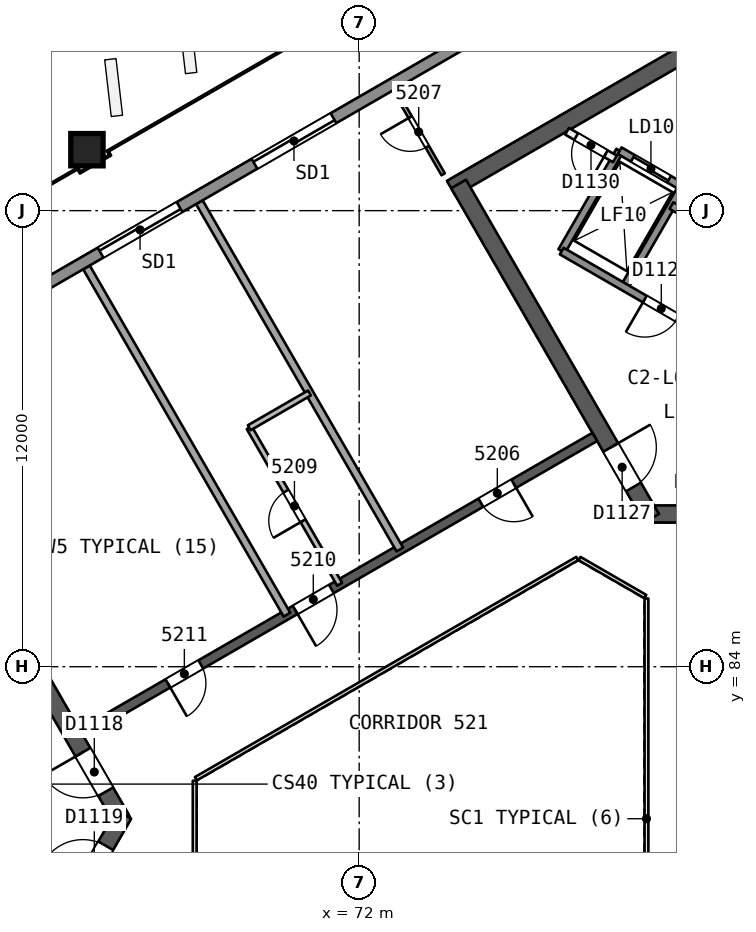
"""IFC4 building model, lengths in metres.
Left out: names, types, materials, properties, quantities, classifications, styles, units other than length and angle.
Written with IfcOpenShell. Run it as: python <this file> out.ifc"""

import sys

from ifc_helpers import new_model, si_unit, direction, frame, frame_2d, origin, origin_2d, place, context, subcontext, project, spatial, rectangle, extrude, element, fill, save


model = new_model("IFC4")
c1 = context("Model", 3, precision=1e-05, world=origin(), true_north=direction((0.0, 1.0)))
c2 = subcontext(c1, "Body", "Model", "MODEL_VIEW")
j1 = project(units=[si_unit("LENGTHUNIT", "METRE"), si_unit("PLANEANGLEUNIT", "RADIAN")], contexts=[c1])
p1 = place(None, origin())
s1 = spatial("IfcSite", under=j1, at=p1, CompositionType="ELEMENT")
p2 = place(p1, origin())
s2 = spatial("IfcBuilding", under=s1, at=p2, CompositionType="ELEMENT")
p3 = place(p2, frame((0.0, 0.0, 213.2)))
s3 = spatial("IfcBuildingStorey", under=s2, at=p3, CompositionType="ELEMENT", Elevation=213.2)
p4 = place(p3, frame((65.74, 80.0, 0.0), z_axis=(0.0, 0.0, 1.0), x_axis=(-0.499991857942, 0.866030104553, 0.0)))
e1 = element("IfcWall", 1, at=p4, inside=s3, PredefinedType="SHEAR", context=c2, shape_type="SweptSolid", body=[
    extrude(rectangle(XDim=10.25, YDim=0.45, at=frame_2d((5.125, 0.0))), origin(), (0.0, 0.0, 1.0), 3.7),
])
p5 = place(p4, frame((0.82, 0.0, 0.0)))
e2 = element("IfcOpeningElement", 2, at=p5, cuts=e1, PredefinedType="OPENING", context=c2, shape_type="SweptSolid", body=[
    extrude(rectangle(XDim=1.2, YDim=2.1, at=frame_2d((0.6, 1.05))), frame((0.0, 0.235, 0.0), z_axis=(0.0, -1.0, 0.0), x_axis=(1.0, 0.0, 0.0)), (0.0, 0.0, 1.0), 0.471),
])
p6 = place(p3, frame((60.728, 71.318, 0.0), z_axis=(0.0, 0.0, 1.0), x_axis=(0.500012416173, 0.866018235185, 0.0)))
e3 = element("IfcWall", 3, at=p6, inside=s3, PredefinedType="SHEAR", context=c2, shape_type="SweptSolid", body=[
    extrude(rectangle(XDim=10.155, YDim=0.45, at=frame_2d((5.078, 0.0))), origin(), (0.0, 0.0, 1.0), 3.7),
])
p7 = place(p6, frame((8.005, 0.0, 0.0)))
e4 = element("IfcOpeningElement", 4, at=p7, cuts=e3, PredefinedType="OPENING", context=c2, shape_type="SweptSolid", body=[
    extrude(rectangle(XDim=1.2, YDim=2.1, at=frame_2d((0.6, 1.05))), frame((0.0, 0.235, 0.0), z_axis=(0.0, -1.0, 0.0), x_axis=(1.0, 0.0, 0.0)), (0.0, 0.0, 1.0), 0.471),
])
p8 = place(p3, frame((79.63, 88.019, 0.0), z_axis=(0.0, 0.0, 1.0), x_axis=(1.0, 0.0, 0.0)))
e5 = element("IfcWall", 5, at=p8, inside=s3, PredefinedType="SHEAR", context=c2, shape_type="SweptSolid", body=[
    extrude(rectangle(XDim=10.25, YDim=0.45, at=frame_2d((5.125, 0.0))), origin(), (0.0, 0.0, 1.0), 3.7),
])
p9 = place(p8, frame((0.82, 0.0, 0.0)))
e6 = element("IfcOpeningElement", 6, at=p9, cuts=e5, PredefinedType="OPENING", context=c2, shape_type="SweptSolid", body=[
    extrude(rectangle(XDim=1.2, YDim=2.1, at=frame_2d((0.6, 1.05))), frame((0.0, 0.235, 0.0), z_axis=(0.0, -1.0, 0.0), x_axis=(1.0, 0.0, 0.0)), (0.0, 0.0, 1.0), 0.471),
])
p10 = place(p3, frame((86.723, 103.69, 0.0), z_axis=(0.0, 0.0, 1.0), x_axis=(-0.866022713978, -0.500004658852, 0.0)))
e7 = element("IfcWall", 7, at=p10, inside=s3, PredefinedType="SHEAR", context=c2, shape_type="SweptSolid", body=[
    extrude(rectangle(XDim=14.203, YDim=0.45, at=frame_2d((7.102, 0.0))), origin(), (0.0, 0.0, 1.0), 3.7),
])
p11 = place(p3, frame((74.617, 96.701, 0.0), z_axis=(0.0, 0.0, 1.0), x_axis=(0.499994385119, -0.866028645513, 0.0)))
e8 = element("IfcWall", 8, at=p11, inside=s3, PredefinedType="SHEAR", context=c2, shape_type="SweptSolid", body=[
    extrude(rectangle(XDim=10.155, YDim=0.45, at=frame_2d((5.077, 0.0))), origin(), (0.0, 0.0, 1.0), 3.7),
])
p12 = place(p11, frame((8.005, 0.0, 0.0)))
e9 = element("IfcOpeningElement", 9, at=p12, cuts=e8, PredefinedType="OPENING", context=c2, shape_type="SweptSolid", body=[
    extrude(rectangle(XDim=1.2, YDim=2.1, at=frame_2d((0.6, 1.05))), frame((0.0, 0.235, 0.0), z_axis=(0.0, -1.0, 0.0), x_axis=(1.0, 0.0, 0.0)), (0.0, 0.0, 1.0), 0.471),
])
p13 = place(p3, frame((78.2, 90.046, 0.0), z_axis=(0.0, 0.0, 1.0), x_axis=(-0.866026492143, -0.499998114903, 0.0)))
e10 = element("IfcWall", 10, at=p13, inside=s3, PredefinedType="SHEAR", context=c2, shape_type="SweptSolid", body=[
    extrude(rectangle(XDim=15.588, YDim=0.25, at=frame_2d((7.794, 0.0))), origin(), (0.0, 0.0, 1.0), 3.3),
])
p14 = place(p13, frame((2.462, 0.0, 0.0)))
e11 = element("IfcOpeningElement", 11, at=p14, cuts=e10, PredefinedType="OPENING", context=c2, shape_type="SweptSolid", body=[
    extrude(rectangle(XDim=1.0, YDim=2.1, at=frame_2d((0.5, 1.05))), frame((0.0, 0.135, 0.0), z_axis=(0.0, -1.0, 0.0), x_axis=(1.0, 0.0, 0.0)), (0.0, 0.0, 1.0), 0.271),
])
p15 = place(p13, frame((8.003, 0.0, 0.0)))
e12 = element("IfcOpeningElement", 12, at=p15, cuts=e10, PredefinedType="OPENING", context=c2, shape_type="SweptSolid", body=[
    extrude(rectangle(XDim=1.1, YDim=2.1, at=frame_2d((0.55, 1.05))), frame((0.0, 0.135, 0.0), z_axis=(0.0, -1.0, 0.0), x_axis=(1.0, 0.0, 0.0)), (0.0, 0.0, 1.0), 0.271),
])
p16 = place(p13, frame((11.971, 0.0, 0.0)))
e13 = element("IfcOpeningElement", 13, at=p16, cuts=e10, PredefinedType="OPENING", context=c2, shape_type="SweptSolid", body=[
    extrude(rectangle(XDim=1.0, YDim=2.1, at=frame_2d((0.5, 1.05))), frame((0.0, 0.135, 0.0), z_axis=(0.0, -1.0, 0.0), x_axis=(1.0, 0.0, 0.0)), (0.0, 0.0, 1.0), 0.271),
])
p17 = place(p3, frame((64.824, 97.625, 0.0), z_axis=(0.010093620709, -0.017482414954, 0.999796221231), x_axis=(0.866011056618, 0.500024849197, 4.54858e-07)))
e14 = element("IfcColumn", 14, at=p17, inside=s3, PredefinedType="COLUMN", context=c2, shape_type="SweptSolid", body=[
    extrude(rectangle(XDim=0.85, YDim=0.85, at=origin_2d()), origin(), (0.0, 0.0, 1.0), 3.701),
])
p18 = place(p3, frame((74.21, 96.956, 0.0), z_axis=(0.0, 0.0, 1.0), x_axis=(-0.49995513091, 0.866051307416, 0.0)))
e15 = element("IfcWall", 15, at=p18, inside=s3, PredefinedType="PARTITIONING", context=c2, shape_type="SweptSolid", body=[
    extrude(rectangle(XDim=2.573, YDim=0.1, at=frame_2d((1.287, 0.0))), origin(), (0.0, 0.0, 1.0), 3.3),
])
p19 = place(p18, frame((0.837, 0.0, 0.0)))
e16 = element("IfcOpeningElement", 16, at=p19, cuts=e15, PredefinedType="OPENING", context=c2, shape_type="SweptSolid", body=[
    extrude(rectangle(XDim=0.9, YDim=2.1, at=frame_2d((0.45, 1.05))), frame((0.0, 0.061, 0.0), z_axis=(0.0, -1.0, 0.0), x_axis=(1.0, 0.0, 0.0)), (0.0, 0.0, 1.0), 0.121),
])
p20 = place(p3, frame((67.794, 96.223, 0.0), z_axis=(0.0, 0.0, 1.0), x_axis=(0.500010840071, -0.866019145176, 0.0)))
e17 = element("IfcWall", 17, at=p20, inside=s3, PredefinedType="PARTITIONING", context=c2, shape_type="SweptSolid", body=[
    extrude(rectangle(XDim=10.552, YDim=0.2, at=frame_2d((5.276, 0.0))), origin(), (0.0, 0.0, 1.0), 3.3),
])
p21 = place(p3, frame((71.486, 86.169, 0.0), z_axis=(0.0, 0.0, 1.0), x_axis=(-0.499987613552, 0.866032554986, 0.0)))
e18 = element("IfcWall", 18, at=p21, inside=s3, PredefinedType="PARTITIONING", context=c2, shape_type="SweptSolid", body=[
    extrude(rectangle(XDim=4.755, YDim=0.15, at=frame_2d((2.378, 0.0))), origin(), (0.0, 0.0, 1.0), 3.3),
])
p22 = place(p21, frame((1.928, 0.0, 0.0)))
e19 = element("IfcOpeningElement", 19, at=p22, cuts=e18, PredefinedType="OPENING", context=c2, shape_type="SweptSolid", body=[
    extrude(rectangle(XDim=0.9, YDim=2.1, at=frame_2d((0.45, 1.05))), frame((0.0, 0.085, 0.0), z_axis=(0.0, -1.0, 0.0), x_axis=(1.0, 0.0, 0.0)), (0.0, 0.0, 1.0), 0.171),
])
p23 = place(p3, frame((69.108, 90.288, 0.0), z_axis=(0.0, 0.0, 1.0), x_axis=(0.866050016054, 0.499957367875, 0.0)))
e20 = element("IfcWall", 20, at=p23, inside=s3, PredefinedType="PARTITIONING", context=c2, shape_type="SweptSolid", body=[
    extrude(rectangle(XDim=1.829, YDim=0.15, at=frame_2d((0.915, 0.0))), origin(), (0.0, 0.0, 1.0), 3.3),
])
p24 = place(p3, frame((64.824, 94.508, 0.0), z_axis=(0.0, 0.0, 1.0), x_axis=(0.500010840071, -0.866019145176, 0.0)))
e21 = element("IfcWall", 21, at=p24, inside=s3, PredefinedType="PARTITIONING", context=c2, shape_type="SweptSolid", body=[
    extrude(rectangle(XDim=10.552, YDim=0.2, at=frame_2d((5.276, 0.0))), origin(), (0.0, 0.0, 1.0), 3.3),
])
p25 = place(p3, frame((43.933, 82.619, 0.0), z_axis=(0.0, 0.0, 1.0), x_axis=(0.866026349667, 0.49999836168, 0.0)))
e22 = element("IfcWall", 22, at=p25, inside=s3, PredefinedType="SOLIDWALL", context=c2, shape_type="SweptSolid", body=[
    extrude(rectangle(XDim=51.192, YDim=0.3, at=frame_2d((25.596, 0.0))), origin(), (0.0, 0.0, 1.0), 3.3),
])
p26 = place(p25, frame((24.552, 0.0, 0.0)))
e23 = element("IfcOpeningElement", 23, at=p26, cuts=e22, PredefinedType="OPENING", context=c2, shape_type="SweptSolid", body=[
    extrude(rectangle(XDim=2.4, YDim=2.4, at=frame_2d((1.2, 1.2))), frame((0.0, 0.161, 0.0), z_axis=(0.0, -1.0, 0.0), x_axis=(1.0, 0.0, 0.0)), (0.0, 0.0, 1.0), 0.321),
])
p27 = place(p25, frame((29.228, 0.0, 0.0)))
e24 = element("IfcOpeningElement", 24, at=p27, cuts=e22, PredefinedType="OPENING", context=c2, shape_type="SweptSolid", body=[
    extrude(rectangle(XDim=2.4, YDim=2.4, at=frame_2d((1.2, 1.2))), frame((0.0, 0.161, 0.0), z_axis=(0.0, -1.0, 0.0), x_axis=(1.0, 0.0, 0.0)), (0.0, 0.0, 1.0), 0.321),
])
p28 = place(p25, frame((39.819, 0.0, 0.0)))
e25 = element("IfcOpeningElement", 25, at=p28, cuts=e22, PredefinedType="OPENING", context=c2, shape_type="SweptSolid", body=[
    extrude(rectangle(XDim=2.4, YDim=2.4, at=frame_2d((1.2, 1.2))), frame((0.0, 0.161, 0.0), z_axis=(0.0, -1.0, 0.0), x_axis=(1.0, 0.0, 0.0)), (0.0, 0.0, 1.0), 0.321),
])
p29 = place(p25, frame((19.719, 0.0, 0.0)))
e26 = element("IfcOpeningElement", 26, at=p29, cuts=e22, PredefinedType="OPENING", context=c2, shape_type="SweptSolid", body=[
    extrude(rectangle(XDim=2.4, YDim=2.4, at=frame_2d((1.2, 1.2))), frame((0.0, 0.161, 0.0), z_axis=(0.0, -1.0, 0.0), x_axis=(1.0, 0.0, 0.0)), (0.0, 0.0, 1.0), 0.321),
])
p30 = place(p25, frame((8.993, 0.0, 0.0)))
e27 = element("IfcOpeningElement", 27, at=p30, cuts=e22, PredefinedType="OPENING", context=c2, shape_type="SweptSolid", body=[
    extrude(rectangle(XDim=2.4, YDim=2.4, at=frame_2d((1.2, 1.2))), frame((0.0, 0.161, 0.0), z_axis=(0.0, -1.0, 0.0), x_axis=(1.0, 0.0, 0.0)), (0.0, 0.0, 1.0), 0.321),
])
for number, where, z_axis, x_axis in (
    (28, (78.976, 93.986, 0.0), (0.0, 0.0, 1.0), (0.5, 0.866, 0.0)),
    (29, (77.33, 94.936, 0.0), (0.0, 0.0, 1.0), (0.5, 0.866, 0.0)),
):
    element("IfcWall", number, at=place(p3, frame(where, z_axis=z_axis, x_axis=x_axis)), inside=s3, PredefinedType="SOLIDWALL", context=c2, shape_type="SweptSolid", body=[
        extrude(rectangle(XDim=3.05, YDim=0.2, at=frame_2d((1.525, 0.0))), origin(), (0.0, 0.0, 1.0), 3.3),
    ])
p31 = place(p3, frame((86.77, 89.486, 0.0), z_axis=(0.0, 0.0, 1.0), x_axis=(-0.86601811187, 0.500012629753, 0.0)))
e30 = element("IfcWall", 30, at=p31, inside=s3, PredefinedType="SOLIDWALL", context=c2, shape_type="SweptSolid", body=[
    extrude(rectangle(XDim=10.9, YDim=0.2, at=frame_2d((5.45, 0.0))), origin(), (0.0, 0.0, 1.0), 3.3),
])
p32 = place(p31, frame((2.875, 0.0, 0.0)))
e31 = element("IfcOpeningElement", 31, at=p32, cuts=e30, PredefinedType="OPENING", context=c2, shape_type="SweptSolid", body=[
    extrude(rectangle(XDim=1.0, YDim=2.1, at=frame_2d((0.5, 1.05))), frame((0.0, 0.11, 0.0), z_axis=(0.0, -1.0, 0.0), x_axis=(1.0, 0.0, 0.0)), (0.0, 0.0, 1.0), 0.221),
])
p33 = place(p31, frame((7.375, 0.0, 0.0)))
e32 = element("IfcOpeningElement", 32, at=p33, cuts=e30, PredefinedType="OPENING", context=c2, shape_type="SweptSolid", body=[
    extrude(rectangle(XDim=1.0, YDim=2.1, at=frame_2d((0.5, 1.05))), frame((0.0, 0.11, 0.0), z_axis=(0.0, -1.0, 0.0), x_axis=(1.0, 0.0, 0.0)), (0.0, 0.0, 1.0), 0.221),
])
p34 = place(p3, frame((89.43, 90.814, 0.0), z_axis=(0.0, 0.0, 1.0), x_axis=(-0.866018983788, 0.500011119594, 0.0)))
e33 = element("IfcWall", 33, at=p34, inside=s3, PredefinedType="SOLIDWALL", context=c2, shape_type="SweptSolid", body=[
    extrude(rectangle(XDim=10.64, YDim=0.2, at=frame_2d((5.32, 0.0))), origin(), (0.0, 0.0, 1.0), 3.3),
])
p35 = place(p34, frame((0.37, 0.0, 0.0)))
e34 = element("IfcOpeningElement", 34, at=p35, cuts=e33, PredefinedType="OPENING", context=c2, shape_type="SweptSolid", body=[
    extrude(rectangle(XDim=0.9, YDim=2.1, at=frame_2d((0.45, 1.05))), frame((0.0, 0.11, 0.0), z_axis=(0.0, -1.0, 0.0), x_axis=(1.0, 0.0, 0.0)), (0.0, 0.0, 1.0), 0.221),
])
p36 = place(p3, frame((78.73, 97.361, 0.0), z_axis=(0.0, 0.0, 1.0), x_axis=(-0.866045896294, 0.499964504253, 0.0)))
e35 = element("IfcWall", 35, at=p36, inside=s3, PredefinedType="PARTITIONING", context=c2, shape_type="SweptSolid", body=[
    extrude(rectangle(XDim=1.455, YDim=0.2, at=frame_2d((0.728, 0.0))), origin(), (0.0, 0.0, 1.0), 3.3),
])
p37 = place(p36, frame((0.278, 0.0, 0.0)))
e36 = element("IfcOpeningElement", 36, at=p37, cuts=e35, PredefinedType="OPENING", context=c2, shape_type="SweptSolid", body=[
    extrude(rectangle(XDim=0.9, YDim=2.1, at=frame_2d((0.45, 1.05))), frame((0.0, 0.11, 0.0), z_axis=(0.0, -1.0, 0.0), x_axis=(1.0, 0.0, 0.0)), (0.0, 0.0, 1.0), 0.221),
])
p38 = place(p3, frame((80.5, 96.627, 0.0), z_axis=(0.0, 0.0, 1.0), x_axis=(-0.86601224135, 0.500022797313, 0.0)))
e37 = element("IfcWall", 37, at=p38, inside=s3, PredefinedType="SOLIDWALL", context=c2, shape_type="SweptSolid", body=[
    extrude(rectangle(XDim=1.9, YDim=0.2, at=frame_2d((0.95, 0.0))), origin(), (0.0, 0.0, 1.0), 3.3),
])
p39 = place(p38, frame((0.4, 0.0, 0.0)))
e38 = element("IfcOpeningElement", 38, at=p39, cuts=e37, PredefinedType="OPENING", context=c2, shape_type="SweptSolid", body=[
    extrude(rectangle(XDim=1.1, YDim=2.1, at=frame_2d((0.55, 1.05))), frame((0.0, 0.11, 0.0), z_axis=(0.0, -1.0, 0.0), x_axis=(1.0, 0.0, 0.0)), (0.0, 0.0, 1.0), 0.221),
])
p40 = place(p3, frame((79.56, 74.206, 0.0), z_axis=(0.0, 0.0, 1.0), x_axis=(0.0, 1.0, 0.0)))
e39 = element("IfcWall", 39, at=p40, inside=s3, PredefinedType="PARTITIONING", context=c2, shape_type="SweptSolid", body=[
    extrude(rectangle(XDim=11.588, YDim=0.1, at=frame_2d((5.794, 0.0))), origin(), (0.0, 0.0, 1.0), 3.3),
])
p41 = place(p3, frame((79.53, 85.846, 0.0), z_axis=(0.0, 0.0, 1.0), x_axis=(-0.866041268327, 0.499972520799, 0.0)))
e40 = element("IfcWall", 40, at=p41, inside=s3, PredefinedType="PARTITIONING", context=c2, shape_type="SweptSolid", body=[
    extrude(rectangle(XDim=2.0, YDim=0.1, at=frame_2d((1.0, 0.0))), origin(), (0.0, 0.0, 1.0), 3.3),
])
p42 = place(p3, frame((77.738, 86.846, 0.0), z_axis=(0.0, 0.0, 1.0), x_axis=(-0.866026658274, -0.499997827154, 0.0)))
e41 = element("IfcWall", 41, at=p42, inside=s3, PredefinedType="PARTITIONING", context=c2, shape_type="SweptSolid", body=[
    extrude(rectangle(XDim=11.588, YDim=0.1, at=frame_2d((5.794, 0.0))), origin(), (0.0, 0.0, 1.0), 3.3),
])
p43 = place(p3, frame((67.672, 81.0, 0.0), z_axis=(0.0, 0.0, 1.0), x_axis=(0.0, -1.0, 0.0)))
e42 = element("IfcWall", 42, at=p43, inside=s3, PredefinedType="PARTITIONING", context=c2, shape_type="SweptSolid", body=[
    extrude(rectangle(XDim=2.0, YDim=0.1, at=frame_2d((1.0, 0.0))), origin(), (0.0, 0.0, 1.0), 3.3),
])
p44 = place(p14, origin())
e43 = element("IfcDoor", 43, at=p44, inside=s3, OperationType="SINGLE_SWING_LEFT", PredefinedType="NOTDEFINED", context=c2, shape_type="SweptSolid", body=[
    extrude(rectangle(XDim=1.0, YDim=2.1, at=frame_2d((0.5, 1.05))), frame((0.0, 0.025, 0.0), z_axis=(0.0, -1.0, 0.0), x_axis=(1.0, 0.0, 0.0)), (0.0, 0.0, 1.0), 0.05),
])
fill(e11, e43)
p45 = place(p19, origin())
e44 = element("IfcDoor", 44, at=p45, inside=s3, OperationType="SINGLE_SWING_RIGHT", PredefinedType="NOTDEFINED", context=c2, shape_type="SweptSolid", body=[
    extrude(rectangle(XDim=0.9, YDim=2.1, at=frame_2d((0.45, 1.05))), frame((0.0, 0.025, 0.0), z_axis=(0.0, -1.0, 0.0), x_axis=(1.0, 0.0, 0.0)), (0.0, 0.0, 1.0), 0.05),
])
fill(e16, e44)
p46 = place(p22, origin())
e45 = element("IfcDoor", 45, at=p46, inside=s3, OperationType="SINGLE_SWING_LEFT", PredefinedType="NOTDEFINED", context=c2, shape_type="SweptSolid", body=[
    extrude(rectangle(XDim=0.9, YDim=2.1, at=frame_2d((0.45, 1.05))), frame((0.0, 0.025, 0.0), z_axis=(0.0, -1.0, 0.0), x_axis=(1.0, 0.0, 0.0)), (0.0, 0.0, 1.0), 0.05),
])
fill(e19, e45)
p47 = place(p15, origin())
e46 = element("IfcDoor", 46, at=p47, inside=s3, OperationType="SINGLE_SWING_RIGHT", PredefinedType="NOTDEFINED", context=c2, shape_type="SweptSolid", body=[
    extrude(rectangle(XDim=1.1, YDim=2.1, at=frame_2d((0.55, 1.05))), frame((0.0, 0.025, 0.0), z_axis=(0.0, -1.0, 0.0), x_axis=(1.0, 0.0, 0.0)), (0.0, 0.0, 1.0), 0.05),
])
fill(e12, e46)
p48 = place(p16, origin())
e47 = element("IfcDoor", 47, at=p48, inside=s3, OperationType="SINGLE_SWING_RIGHT", PredefinedType="NOTDEFINED", context=c2, shape_type="SweptSolid", body=[
    extrude(rectangle(XDim=1.0, YDim=2.1, at=frame_2d((0.5, 1.05))), frame((0.0, 0.025, 0.0), z_axis=(0.0, -1.0, 0.0), x_axis=(1.0, 0.0, 0.0)), (0.0, 0.0, 1.0), 0.05),
])
fill(e13, e47)
p49 = place(p26, origin())
e48 = element("IfcDoor", 48, at=p49, inside=s3, OperationType="SLIDING_TO_LEFT", PredefinedType="NOTDEFINED", context=c2, shape_type="SweptSolid", body=[
    extrude(rectangle(XDim=2.4, YDim=2.4, at=frame_2d((1.2, 1.2))), frame((0.0, 0.025, 0.0), z_axis=(0.0, -1.0, 0.0), x_axis=(1.0, 0.0, 0.0)), (0.0, 0.0, 1.0), 0.05),
])
fill(e23, e48)
p50 = place(p27, origin())
e49 = element("IfcDoor", 49, at=p50, inside=s3, OperationType="SLIDING_TO_RIGHT", PredefinedType="NOTDEFINED", context=c2, shape_type="SweptSolid", body=[
    extrude(rectangle(XDim=2.4, YDim=2.4, at=frame_2d((1.2, 1.2))), frame((0.0, 0.025, 0.0), z_axis=(0.0, -1.0, 0.0), x_axis=(1.0, 0.0, 0.0)), (0.0, 0.0, 1.0), 0.05),
])
fill(e24, e49)
p51 = place(p5, origin())
e50 = element("IfcDoor", 50, at=p51, inside=s3, OperationType="SINGLE_SWING_RIGHT", PredefinedType="NOTDEFINED", context=c2, shape_type="SweptSolid", body=[
    extrude(rectangle(XDim=1.2, YDim=2.1, at=frame_2d((0.6, 1.05))), frame((0.0, 0.025, 0.0), z_axis=(0.0, -1.0, 0.0), x_axis=(1.0, 0.0, 0.0)), (0.0, 0.0, 1.0), 0.05),
])
fill(e2, e50)
p52 = place(p7, origin())
e51 = element("IfcDoor", 51, at=p52, inside=s3, OperationType="SINGLE_SWING_LEFT", PredefinedType="NOTDEFINED", context=c2, shape_type="SweptSolid", body=[
    extrude(rectangle(XDim=1.2, YDim=2.1, at=frame_2d((0.6, 1.05))), frame((0.0, 0.025, 0.0), z_axis=(0.0, -1.0, 0.0), x_axis=(1.0, 0.0, 0.0)), (0.0, 0.0, 1.0), 0.05),
])
fill(e4, e51)
p53 = place(p12, origin())
e52 = element("IfcDoor", 52, at=p53, inside=s3, OperationType="SINGLE_SWING_LEFT", PredefinedType="NOTDEFINED", context=c2, shape_type="SweptSolid", body=[
    extrude(rectangle(XDim=1.2, YDim=2.1, at=frame_2d((0.6, 1.05))), frame((0.0, 0.025, 0.0), z_axis=(0.0, -1.0, 0.0), x_axis=(1.0, 0.0, 0.0)), (0.0, 0.0, 1.0), 0.05),
])
fill(e9, e52)
p54 = place(p39, origin())
e53 = element("IfcDoor", 53, at=p54, inside=s3, OperationType="SLIDING_TO_RIGHT", PredefinedType="NOTDEFINED", context=c2, shape_type="SweptSolid", body=[
    extrude(rectangle(XDim=1.1, YDim=2.1, at=frame_2d((0.55, 1.05))), frame((0.0, 0.025, 0.0), z_axis=(0.0, -1.0, 0.0), x_axis=(1.0, 0.0, 0.0)), (0.0, 0.0, 1.0), 0.05),
])
fill(e38, e53)
p55 = place(p33, origin())
e54 = element("IfcDoor", 54, at=p55, inside=s3, OperationType="SINGLE_SWING_RIGHT", PredefinedType="NOTDEFINED", context=c2, shape_type="SweptSolid", body=[
    extrude(rectangle(XDim=1.0, YDim=2.1, at=frame_2d((0.5, 1.05))), frame((0.0, 0.025, 0.0), z_axis=(0.0, -1.0, 0.0), x_axis=(1.0, 0.0, 0.0)), (0.0, 0.0, 1.0), 0.05),
])
fill(e32, e54)
p56 = place(p37, origin())
e55 = element("IfcDoor", 55, at=p56, inside=s3, OperationType="SINGLE_SWING_LEFT", PredefinedType="NOTDEFINED", context=c2, shape_type="SweptSolid", body=[
    extrude(rectangle(XDim=0.9, YDim=2.1, at=frame_2d((0.45, 1.05))), frame((0.0, 0.025, 0.0), z_axis=(0.0, -1.0, 0.0), x_axis=(1.0, 0.0, 0.0)), (0.0, 0.0, 1.0), 0.05),
])
fill(e36, e55)
save(model, sys.argv[1])
